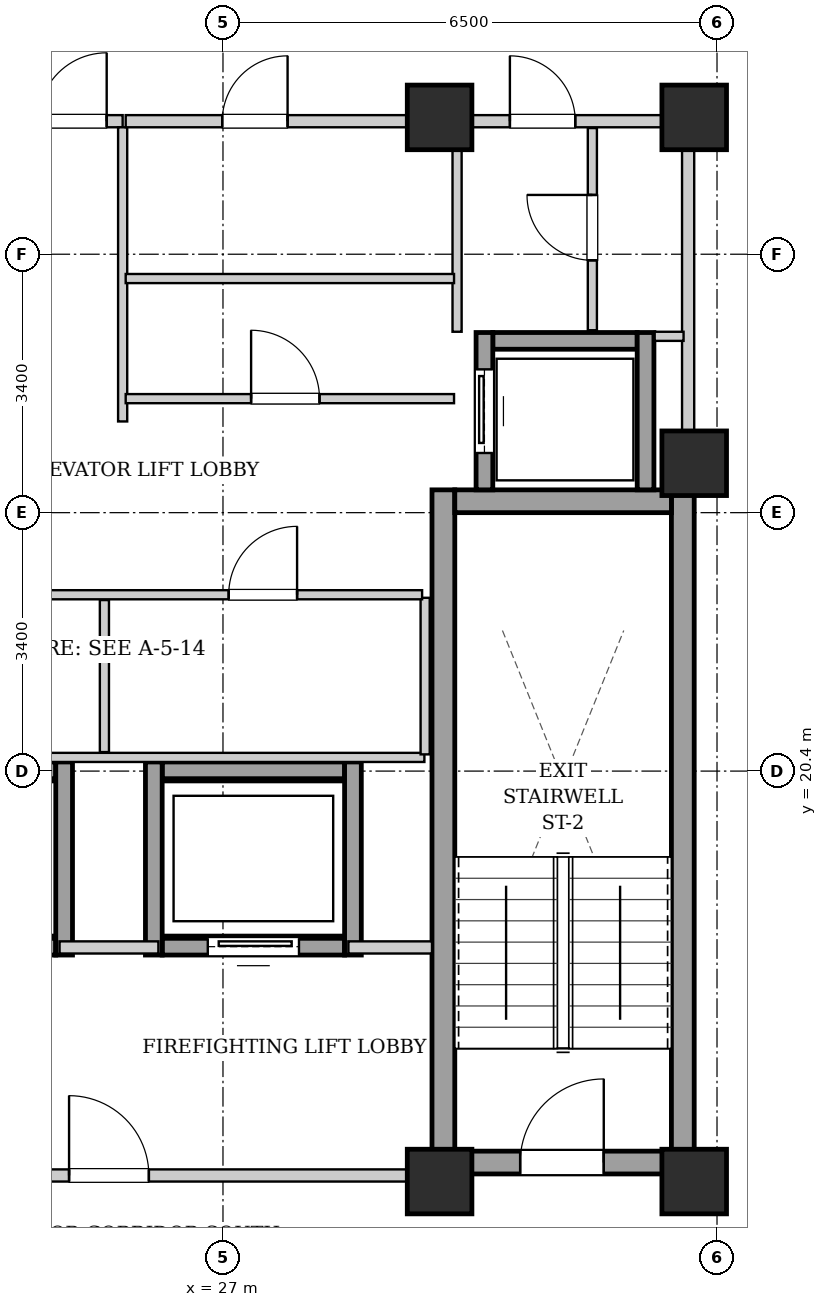
"""IFC4 building model, lengths in metres.
Left out: names, types, materials, properties, quantities, classifications, styles, units other than length and angle.
Written with IfcOpenShell. Run it as: python <this file> out.ifc"""

import sys

from ifc_helpers import new_model, si_unit, direction, frame, frame_2d, origin, origin_2d, place, context, subcontext, project, spatial, rectangle, extrude, element, fill, save


model = new_model("IFC4")
c1 = context("Model", 3, precision=1e-05, world=origin(), true_north=direction((0.0, 1.0)))
c2 = subcontext(c1, "Body", "Model", "MODEL_VIEW")
j1 = project(units=[si_unit("LENGTHUNIT", "METRE"), si_unit("PLANEANGLEUNIT", "RADIAN")], contexts=[c1])
p1 = place(None, origin())
s1 = spatial("IfcSite", under=j1, at=p1, CompositionType="ELEMENT")
p2 = place(p1, origin())
s2 = spatial("IfcBuilding", under=s1, at=p2, CompositionType="ELEMENT")
p3 = place(p2, frame((0.0, 0.0, 190.9)))
s3 = spatial("IfcBuildingStorey", under=s2, at=p3, CompositionType="ELEMENT", Elevation=190.9)
for number, where, z_axis, x_axis in (
    (1, (29.85, 15.0, 0.0), (0.0, 0.0, 1.0), (1.0, 0.0, 0.0)),
    (2, (33.2, 15.0, 0.0), (0.0, 0.0, 1.0), (1.0, 0.0, 0.0)),
    (3, (29.85, 29.0, 0.0), (0.0, 0.0, 1.0), (1.0, 0.0, 0.0)),
    (4, (33.2, 29.0, 0.0), (0.0, 0.0, 1.0), (1.0, 0.0, 0.0)),
    (5, (33.2, 24.45, 0.0), (0.0, 0.0, 1.0), (1.0, 0.0, 0.0)),
):
    element("IfcColumn", number, at=place(p3, frame(where, z_axis=z_axis, x_axis=x_axis)), inside=s3, PredefinedType="COLUMN", context=c2, shape_type="SweptSolid", body=[
        extrude(rectangle(XDim=0.85, YDim=0.85, at=origin_2d()), origin(), (0.0, 0.0, 1.0), 3.3),
    ])
for number, where, z_axis, x_axis in (
    (6, (29.9, 15.1, 0.0), (0.0, 0.0, 1.0), (0.0, 1.0, 0.0)),
    (7, (33.05, 15.1, 0.0), (0.0, 0.0, 1.0), (0.0, 1.0, 0.0)),
):
    element("IfcWall", number, at=place(p3, frame(where, z_axis=z_axis, x_axis=x_axis)), inside=s3, PredefinedType="SHEAR", context=c2, shape_type="SweptSolid", body=[
        extrude(rectangle(XDim=9.0, YDim=0.3, at=frame_2d((4.5, 0.0))), origin(), (0.0, 0.0, 1.0), 3.04),
    ])
p4 = place(p3, frame((30.05, 23.95, 0.0), z_axis=(0.0, 0.0, 1.0), x_axis=(1.0, 0.0, 0.0)))
e8 = element("IfcWall", 8, at=p4, inside=s3, PredefinedType="SHEAR", context=c2, shape_type="SweptSolid", body=[
    extrude(rectangle(XDim=2.85, YDim=0.3, at=frame_2d((1.425, 0.0))), origin(), (0.0, 0.0, 1.0), 3.04),
])
p5 = place(p3, frame((30.05, 15.25, 0.0), z_axis=(0.0, 0.0, 1.0), x_axis=(1.0, 0.0, 0.0)))
e9 = element("IfcWall", 9, at=p5, inside=s3, PredefinedType="SHEAR", context=c2, shape_type="SweptSolid", body=[
    extrude(rectangle(XDim=2.85, YDim=0.3, at=frame_2d((1.425, 0.0))), origin(), (0.0, 0.0, 1.0), 3.04),
])
p6 = place(p5, frame((0.86, 0.0, 0.0)))
e10 = element("IfcOpeningElement", 10, at=p6, cuts=e9, PredefinedType="OPENING", context=c2, shape_type="SweptSolid", body=[
    extrude(rectangle(XDim=1.1, YDim=2.05, at=frame_2d((0.55, 1.025))), frame((0.0, 0.16, 0.0), z_axis=(0.0, -1.0, 0.0), x_axis=(1.0, 0.0, 0.0)), (0.0, 0.0, 1.0), 0.32),
])
p7 = place(p3, frame((30.55, 26.06, 0.0), z_axis=(0.0, 0.0, 1.0), x_axis=(1.0, 0.0, 0.0)))
e11 = element("IfcWall", 11, at=p7, inside=s3, PredefinedType="SHEAR", context=c2, shape_type="SweptSolid", body=[
    extrude(rectangle(XDim=1.9, YDim=0.22, at=frame_2d((0.95, 0.0))), origin(), (0.0, 0.0, 1.0), 3.04),
])
p8 = place(p3, frame((30.44, 24.1, 0.0), z_axis=(0.0, 0.0, 1.0), x_axis=(0.0, 1.0, 0.0)))
e12 = element("IfcWall", 12, at=p8, inside=s3, PredefinedType="SHEAR", context=c2, shape_type="SweptSolid", body=[
    extrude(rectangle(XDim=2.07, YDim=0.22, at=frame_2d((1.035, 0.0))), origin(), (0.0, 0.0, 1.0), 3.04),
])
p9 = place(p8, frame((0.485, 0.0, 0.0)))
e13 = element("IfcOpeningElement", 13, at=p9, cuts=e12, PredefinedType="OPENING", context=c2, shape_type="SweptSolid", body=[
    extrude(rectangle(XDim=1.1, YDim=2.15, at=frame_2d((0.55, 1.075))), frame((0.0, 0.12, 0.0), z_axis=(0.0, -1.0, 0.0), x_axis=(1.0, 0.0, 0.0)), (0.0, 0.0, 1.0), 0.24),
])
p10 = place(p3, frame((32.56, 24.1, 0.0), z_axis=(0.0, 0.0, 1.0), x_axis=(0.0, 1.0, 0.0)))
e14 = element("IfcWall", 14, at=p10, inside=s3, PredefinedType="SHEAR", context=c2, shape_type="SweptSolid", body=[
    extrude(rectangle(XDim=2.07, YDim=0.22, at=frame_2d((1.035, 0.0))), origin(), (0.0, 0.0, 1.0), 3.04),
])
p11 = place(p3, frame((22.4, 18.09, 0.0), z_axis=(0.0, 0.0, 1.0), x_axis=(1.0, 0.0, 0.0)))
e15 = element("IfcWall", 15, at=p11, inside=s3, PredefinedType="SHEAR", context=c2, shape_type="SweptSolid", body=[
    extrude(rectangle(XDim=2.4, YDim=0.22, at=frame_2d((1.2, 0.0))), origin(), (0.0, 0.0, 1.0), 3.04),
])
p12 = place(p11, frame((0.6, 0.0, 0.0)))
e16 = element("IfcOpeningElement", 16, at=p12, cuts=e15, PredefinedType="OPENING", context=c2, shape_type="SweptSolid", body=[
    extrude(rectangle(XDim=1.2, YDim=2.15, at=frame_2d((0.6, 1.075))), frame((0.0, 0.12, 0.0), z_axis=(0.0, -1.0, 0.0), x_axis=(1.0, 0.0, 0.0)), (0.0, 0.0, 1.0), 0.24),
])
p13 = place(p3, frame((22.4, 20.41, 0.0), z_axis=(0.0, 0.0, 1.0), x_axis=(1.0, 0.0, 0.0)))
e17 = element("IfcWall", 17, at=p13, inside=s3, PredefinedType="SHEAR", context=c2, shape_type="SweptSolid", body=[
    extrude(rectangle(XDim=2.4, YDim=0.22, at=frame_2d((1.2, 0.0))), origin(), (0.0, 0.0, 1.0), 3.04),
])
p14 = place(p3, frame((24.91, 17.98, 0.0), z_axis=(0.0, 0.0, 1.0), x_axis=(0.0, 1.0, 0.0)))
e18 = element("IfcWall", 18, at=p14, inside=s3, PredefinedType="SHEAR", context=c2, shape_type="SweptSolid", body=[
    extrude(rectangle(XDim=2.54, YDim=0.22, at=frame_2d((1.27, 0.0))), origin(), (0.0, 0.0, 1.0), 3.04),
])
p15 = place(p3, frame((26.2, 18.09, 0.0), z_axis=(0.0, 0.0, 1.0), x_axis=(1.0, 0.0, 0.0)))
e19 = element("IfcWall", 19, at=p15, inside=s3, PredefinedType="SHEAR", context=c2, shape_type="SweptSolid", body=[
    extrude(rectangle(XDim=2.4, YDim=0.22, at=frame_2d((1.2, 0.0))), origin(), (0.0, 0.0, 1.0), 3.04),
])
p16 = place(p15, frame((0.6, 0.0, 0.0)))
e20 = element("IfcOpeningElement", 20, at=p16, cuts=e19, PredefinedType="OPENING", context=c2, shape_type="SweptSolid", body=[
    extrude(rectangle(XDim=1.2, YDim=2.15, at=frame_2d((0.6, 1.075))), frame((0.0, 0.12, 0.0), z_axis=(0.0, -1.0, 0.0), x_axis=(1.0, 0.0, 0.0)), (0.0, 0.0, 1.0), 0.24),
])
p17 = place(p3, frame((26.2, 20.41, 0.0), z_axis=(0.0, 0.0, 1.0), x_axis=(1.0, 0.0, 0.0)))
e21 = element("IfcWall", 21, at=p17, inside=s3, PredefinedType="SHEAR", context=c2, shape_type="SweptSolid", body=[
    extrude(rectangle(XDim=2.4, YDim=0.22, at=frame_2d((1.2, 0.0))), origin(), (0.0, 0.0, 1.0), 3.04),
])
for number, where, z_axis, x_axis in (
    (22, (26.09, 17.98, 0.0), (0.0, 0.0, 1.0), (0.0, 1.0, 0.0)),
    (23, (28.71, 17.98, 0.0), (0.0, 0.0, 1.0), (0.0, 1.0, 0.0)),
):
    element("IfcWall", number, at=place(p3, frame(where, z_axis=z_axis, x_axis=x_axis)), inside=s3, PredefinedType="SHEAR", context=c2, shape_type="SweptSolid", body=[
        extrude(rectangle(XDim=2.54, YDim=0.22, at=frame_2d((1.27, 0.0))), origin(), (0.0, 0.0, 1.0), 3.04),
    ])
p18 = place(p3, frame((21.25, 15.08, 0.0), z_axis=(0.0, 0.0, 1.0), x_axis=(1.0, 0.0, 0.0)))
e24 = element("IfcWall", 24, at=p18, inside=s3, PredefinedType="PARTITIONING", context=c2, shape_type="SweptSolid", body=[
    extrude(rectangle(XDim=8.5, YDim=0.16, at=frame_2d((4.25, 0.0))), origin(), (0.0, 0.0, 1.0), 2.556),
])
p19 = place(p18, frame((3.725, 0.0, 0.0)))
e25 = element("IfcOpeningElement", 25, at=p19, cuts=e24, PredefinedType="OPENING", context=c2, shape_type="SweptSolid", body=[
    extrude(rectangle(XDim=1.05, YDim=2.05, at=frame_2d((0.525, 1.025))), frame((0.0, 0.09, 0.0), z_axis=(0.0, -1.0, 0.0), x_axis=(1.0, 0.0, 0.0)), (0.0, 0.0, 1.0), 0.18),
])
p20 = place(p3, frame((24.85, 18.08, 0.0), z_axis=(0.0, 0.0, 1.0), x_axis=(1.0, 0.0, 0.0)))
e26 = element("IfcWall", 26, at=p20, inside=s3, PredefinedType="PARTITIONING", context=c2, shape_type="SweptSolid", body=[
    extrude(rectangle(XDim=1.3, YDim=0.16, at=frame_2d((0.65, 0.0))), origin(), (0.0, 0.0, 1.0), 3.04),
])
p21 = place(p3, frame((28.65, 18.08, 0.0), z_axis=(0.0, 0.0, 1.0), x_axis=(1.0, 0.0, 0.0)))
e27 = element("IfcWall", 27, at=p21, inside=s3, PredefinedType="PARTITIONING", context=c2, shape_type="SweptSolid", body=[
    extrude(rectangle(XDim=1.1, YDim=0.16, at=frame_2d((0.55, 0.0))), origin(), (0.0, 0.0, 1.0), 3.04),
])
p22 = place(p3, frame((33.12, 24.12, 0.0), z_axis=(0.0, 0.0, 1.0), x_axis=(0.0, 1.0, 0.0)))
e28 = element("IfcWall", 28, at=p22, inside=s3, PredefinedType="PARTITIONING", context=c2, shape_type="SweptSolid", body=[
    extrude(rectangle(XDim=4.76, YDim=0.16, at=frame_2d((2.38, 0.0))), origin(), (0.0, 0.0, 1.0), 3.04),
])
p23 = place(p3, frame((24.36, 28.95, 0.0), z_axis=(0.0, 0.0, 1.0), x_axis=(1.0, 0.0, 0.0)))
e29 = element("IfcWall", 29, at=p23, inside=s3, PredefinedType="PARTITIONING", context=c2, shape_type="SweptSolid", body=[
    extrude(rectangle(XDim=1.32, YDim=0.16, at=frame_2d((0.66, 0.0))), origin(), (0.0, 0.0, 1.0), 2.556),
])
p24 = place(p23, frame((0.21, 0.0, 0.0)))
e30 = element("IfcOpeningElement", 30, at=p24, cuts=e29, PredefinedType="OPENING", context=c2, shape_type="SweptSolid", body=[
    extrude(rectangle(XDim=0.9, YDim=2.05, at=frame_2d((0.45, 1.025))), frame((0.0, 0.09, 0.0), z_axis=(0.0, -1.0, 0.0), x_axis=(1.0, 0.0, 0.0)), (0.0, 0.0, 1.0), 0.18),
])
p25 = place(p3, frame((25.68, 25.0, 0.0), z_axis=(0.0, 0.0, 1.0), x_axis=(0.0, 1.0, 0.0)))
e31 = element("IfcWall", 31, at=p25, inside=s3, PredefinedType="PARTITIONING", context=c2, shape_type="SweptSolid", body=[
    extrude(rectangle(XDim=3.87, YDim=0.12, at=frame_2d((1.935, 0.0))), origin(), (0.0, 0.0, 1.0), 3.04),
])
p26 = place(p3, frame((30.08, 26.18, 0.0), z_axis=(0.0, 0.0, 1.0), x_axis=(0.0, 1.0, 0.0)))
e32 = element("IfcWall", 32, at=p26, inside=s3, PredefinedType="PARTITIONING", context=c2, shape_type="SweptSolid", body=[
    extrude(rectangle(XDim=2.68, YDim=0.12, at=frame_2d((1.34, 0.0))), origin(), (0.0, 0.0, 1.0), 3.04),
])
p27 = place(p3, frame((32.68, 26.12, 0.0), z_axis=(0.0, 0.0, 1.0), x_axis=(1.0, 0.0, 0.0)))
e33 = element("IfcWall", 33, at=p27, inside=s3, PredefinedType="PARTITIONING", context=c2, shape_type="SweptSolid", body=[
    extrude(rectangle(XDim=0.38, YDim=0.12, at=frame_2d((0.19, 0.0))), origin(), (0.0, 0.0, 1.0), 3.04),
])
p28 = place(p3, frame((31.86, 26.2, 0.0), z_axis=(0.0, 0.0, 1.0), x_axis=(0.0, 1.0, 0.0)))
e34 = element("IfcWall", 34, at=p28, inside=s3, PredefinedType="PARTITIONING", context=c2, shape_type="SweptSolid", body=[
    extrude(rectangle(XDim=2.66, YDim=0.12, at=frame_2d((1.33, 0.0))), origin(), (0.0, 0.0, 1.0), 3.04),
])
p29 = place(p28, frame((0.92, 0.0, 0.0)))
e35 = element("IfcOpeningElement", 35, at=p29, cuts=e34, PredefinedType="OPENING", context=c2, shape_type="SweptSolid", body=[
    extrude(rectangle(XDim=0.86, YDim=2.05, at=frame_2d((0.43, 1.025))), frame((0.0, 0.07, 0.0), z_axis=(0.0, -1.0, 0.0), x_axis=(1.0, 0.0, 0.0)), (0.0, 0.0, 1.0), 0.14),
])
p30 = place(p3, frame((30.08, 28.95, 0.0), z_axis=(0.0, 0.0, 1.0), x_axis=(1.0, 0.0, 0.0)))
e36 = element("IfcWall", 36, at=p30, inside=s3, PredefinedType="PARTITIONING", context=c2, shape_type="SweptSolid", body=[
    extrude(rectangle(XDim=2.96, YDim=0.16, at=frame_2d((1.48, 0.0))), origin(), (0.0, 0.0, 1.0), 3.04),
])
p31 = place(p30, frame((0.695, 0.0, 0.0)))
e37 = element("IfcOpeningElement", 37, at=p31, cuts=e36, PredefinedType="OPENING", context=c2, shape_type="SweptSolid", body=[
    extrude(rectangle(XDim=0.86, YDim=2.05, at=frame_2d((0.43, 1.025))), frame((0.0, 0.09, 0.0), z_axis=(0.0, -1.0, 0.0), x_axis=(1.0, 0.0, 0.0)), (0.0, 0.0, 1.0), 0.18),
])
p32 = place(p3, frame((25.72, 26.88, 0.0), z_axis=(0.0, 0.0, 1.0), x_axis=(1.0, 0.0, 0.0)))
e38 = element("IfcWall", 38, at=p32, inside=s3, PredefinedType="PARTITIONING", context=c2, shape_type="SweptSolid", body=[
    extrude(rectangle(XDim=4.32, YDim=0.12, at=frame_2d((2.16, 0.0))), origin(), (0.0, 0.0, 1.0), 3.04),
])
p33 = place(p3, frame((25.72, 25.3, 0.0), z_axis=(0.0, 0.0, 1.0), x_axis=(1.0, 0.0, 0.0)))
e39 = element("IfcWall", 39, at=p33, inside=s3, PredefinedType="PARTITIONING", context=c2, shape_type="SweptSolid", body=[
    extrude(rectangle(XDim=4.32, YDim=0.12, at=frame_2d((2.16, 0.0))), origin(), (0.0, 0.0, 1.0), 3.04),
])
p34 = place(p33, frame((1.65, 0.0, 0.0)))
e40 = element("IfcOpeningElement", 40, at=p34, cuts=e39, PredefinedType="OPENING", context=c2, shape_type="SweptSolid", body=[
    extrude(rectangle(XDim=0.9, YDim=2.05, at=frame_2d((0.45, 1.025))), frame((0.0, 0.07, 0.0), z_axis=(0.0, -1.0, 0.0), x_axis=(1.0, 0.0, 0.0)), (0.0, 0.0, 1.0), 0.14),
])
p35 = place(p3, frame((25.72, 28.95, 0.0), z_axis=(0.0, 0.0, 1.0), x_axis=(1.0, 0.0, 0.0)))
e41 = element("IfcWall", 41, at=p35, inside=s3, PredefinedType="PARTITIONING", context=c2, shape_type="SweptSolid", body=[
    extrude(rectangle(XDim=4.32, YDim=0.16, at=frame_2d((2.16, 0.0))), origin(), (0.0, 0.0, 1.0), 2.556),
])
p36 = place(p35, frame((1.27, 0.0, 0.0)))
e42 = element("IfcOpeningElement", 42, at=p36, cuts=e41, PredefinedType="OPENING", context=c2, shape_type="SweptSolid", body=[
    extrude(rectangle(XDim=0.86, YDim=2.05, at=frame_2d((0.43, 1.025))), frame((0.0, 0.09, 0.0), z_axis=(0.0, -1.0, 0.0), x_axis=(1.0, 0.0, 0.0)), (0.0, 0.0, 1.0), 0.18),
])
p37 = place(p3, frame((22.3, 20.58, 0.0), z_axis=(0.0, 0.0, 1.0), x_axis=(1.0, 0.0, 0.0)))
e43 = element("IfcWall", 43, at=p37, inside=s3, PredefinedType="PARTITIONING", context=c2, shape_type="SweptSolid", body=[
    extrude(rectangle(XDim=7.35, YDim=0.12, at=frame_2d((3.675, 0.0))), origin(), (0.0, 0.0, 1.0), 3.04),
])
p38 = place(p3, frame((29.66, 20.62, 0.0), z_axis=(0.0, 0.0, 1.0), x_axis=(0.0, 1.0, 0.0)))
e44 = element("IfcWall", 44, at=p38, inside=s3, PredefinedType="PARTITIONING", context=c2, shape_type="SweptSolid", body=[
    extrude(rectangle(XDim=2.06, YDim=0.12, at=frame_2d((1.03, 0.0))), origin(), (0.0, 0.0, 1.0), 3.04),
])
p39 = place(p3, frame((25.44, 20.65, 0.0), z_axis=(0.0, 0.0, 1.0), x_axis=(0.0, 1.0, 0.0)))
e45 = element("IfcWall", 45, at=p39, inside=s3, PredefinedType="PARTITIONING", context=c2, shape_type="SweptSolid", body=[
    extrude(rectangle(XDim=2.0, YDim=0.12, at=frame_2d((1.0, 0.0))), origin(), (0.0, 0.0, 1.0), 3.04),
])
p40 = place(p3, frame((22.35, 22.72, 0.0), z_axis=(0.0, 0.0, 1.0), x_axis=(1.0, 0.0, 0.0)))
e46 = element("IfcWall", 46, at=p40, inside=s3, PredefinedType="PARTITIONING", context=c2, shape_type="SweptSolid", body=[
    extrude(rectangle(XDim=7.27, YDim=0.12, at=frame_2d((3.635, 0.0))), origin(), (0.0, 0.0, 1.0), 3.04),
])
p41 = place(p40, frame((1.175, 0.0, 0.0)))
e47 = element("IfcOpeningElement", 47, at=p41, cuts=e46, PredefinedType="OPENING", context=c2, shape_type="SweptSolid", body=[
    extrude(rectangle(XDim=0.9, YDim=2.05, at=frame_2d((0.45, 1.025))), frame((0.0, 0.07, 0.0), z_axis=(0.0, -1.0, 0.0), x_axis=(1.0, 0.0, 0.0)), (0.0, 0.0, 1.0), 0.14),
])
p42 = place(p40, frame((4.725, 0.0, 0.0)))
e48 = element("IfcOpeningElement", 48, at=p42, cuts=e46, PredefinedType="OPENING", context=c2, shape_type="SweptSolid", body=[
    extrude(rectangle(XDim=0.9, YDim=2.05, at=frame_2d((0.45, 1.025))), frame((0.0, 0.07, 0.0), z_axis=(0.0, -1.0, 0.0), x_axis=(1.0, 0.0, 0.0)), (0.0, 0.0, 1.0), 0.14),
])
p43 = place(p6, origin())
e49 = element("IfcDoor", 49, at=p43, inside=s3, OperationType="SINGLE_SWING_RIGHT", PredefinedType="DOOR", context=c2, shape_type="SweptSolid", body=[
    extrude(rectangle(XDim=1.1, YDim=2.05, at=frame_2d((0.55, 1.025))), frame((0.0, 0.025, 0.0), z_axis=(0.0, -1.0, 0.0), x_axis=(1.0, 0.0, 0.0)), (0.0, 0.0, 1.0), 0.05),
])
fill(e10, e49)
p44 = place(p9, origin())
e50 = element("IfcDoor", 50, at=p44, inside=s3, OperationType="SLIDING_TO_LEFT", PredefinedType="DOOR", context=c2, shape_type="SweptSolid", body=[
    extrude(rectangle(XDim=1.1, YDim=2.15, at=frame_2d((0.55, 1.075))), frame((0.0, 0.025, 0.0), z_axis=(0.0, -1.0, 0.0), x_axis=(1.0, 0.0, 0.0)), (0.0, 0.0, 1.0), 0.05),
])
fill(e13, e50)
p45 = place(p16, origin())
e51 = element("IfcDoor", 51, at=p45, inside=s3, OperationType="SLIDING_TO_LEFT", PredefinedType="DOOR", context=c2, shape_type="SweptSolid", body=[
    extrude(rectangle(XDim=1.2, YDim=2.15, at=frame_2d((0.6, 1.075))), frame((0.0, 0.025, 0.0), z_axis=(0.0, -1.0, 0.0), x_axis=(1.0, 0.0, 0.0)), (0.0, 0.0, 1.0), 0.05),
])
fill(e20, e51)
p46 = place(p19, origin())
e52 = element("IfcDoor", 52, at=p46, inside=s3, OperationType="SINGLE_SWING_LEFT", PredefinedType="DOOR", context=c2, shape_type="SweptSolid", body=[
    extrude(rectangle(XDim=1.05, YDim=2.05, at=frame_2d((0.525, 1.025))), frame((0.0, 0.025, 0.0), z_axis=(0.0, -1.0, 0.0), x_axis=(1.0, 0.0, 0.0)), (0.0, 0.0, 1.0), 0.05),
])
fill(e25, e52)
p47 = place(p24, origin())
e53 = element("IfcDoor", 53, at=p47, inside=s3, OperationType="SINGLE_SWING_RIGHT", PredefinedType="DOOR", context=c2, shape_type="SweptSolid", body=[
    extrude(rectangle(XDim=0.9, YDim=2.05, at=frame_2d((0.45, 1.025))), frame((0.0, 0.025, 0.0), z_axis=(0.0, -1.0, 0.0), x_axis=(1.0, 0.0, 0.0)), (0.0, 0.0, 1.0), 0.05),
])
fill(e30, e53)
p48 = place(p29, origin())
e54 = element("IfcDoor", 54, at=p48, inside=s3, OperationType="SINGLE_SWING_RIGHT", PredefinedType="DOOR", context=c2, shape_type="SweptSolid", body=[
    extrude(rectangle(XDim=0.86, YDim=2.05, at=frame_2d((0.43, 1.025))), frame((0.0, 0.025, 0.0), z_axis=(0.0, -1.0, 0.0), x_axis=(1.0, 0.0, 0.0)), (0.0, 0.0, 1.0), 0.05),
])
fill(e35, e54)
p49 = place(p31, origin())
e55 = element("IfcDoor", 55, at=p49, inside=s3, OperationType="SINGLE_SWING_LEFT", PredefinedType="DOOR", context=c2, shape_type="SweptSolid", body=[
    extrude(rectangle(XDim=0.86, YDim=2.05, at=frame_2d((0.43, 1.025))), frame((0.0, 0.025, 0.0), z_axis=(0.0, -1.0, 0.0), x_axis=(1.0, 0.0, 0.0)), (0.0, 0.0, 1.0), 0.05),
])
fill(e37, e55)
p50 = place(p34, origin())
e56 = element("IfcDoor", 56, at=p50, inside=s3, OperationType="SINGLE_SWING_LEFT", PredefinedType="DOOR", context=c2, shape_type="SweptSolid", body=[
    extrude(rectangle(XDim=0.9, YDim=2.05, at=frame_2d((0.45, 1.025))), frame((0.0, 0.025, 0.0), z_axis=(0.0, -1.0, 0.0), x_axis=(1.0, 0.0, 0.0)), (0.0, 0.0, 1.0), 0.05),
])
fill(e40, e56)
p51 = place(p36, origin())
e57 = element("IfcDoor", 57, at=p51, inside=s3, OperationType="SINGLE_SWING_RIGHT", PredefinedType="DOOR", context=c2, shape_type="SweptSolid", body=[
    extrude(rectangle(XDim=0.86, YDim=2.05, at=frame_2d((0.43, 1.025))), frame((0.0, 0.025, 0.0), z_axis=(0.0, -1.0, 0.0), x_axis=(1.0, 0.0, 0.0)), (0.0, 0.0, 1.0), 0.05),
])
fill(e42, e57)
p52 = place(p42, origin())
e58 = element("IfcDoor", 58, at=p52, inside=s3, OperationType="SINGLE_SWING_RIGHT", PredefinedType="DOOR", context=c2, shape_type="SweptSolid", body=[
    extrude(rectangle(XDim=0.9, YDim=2.05, at=frame_2d((0.45, 1.025))), frame((0.0, 0.025, 0.0), z_axis=(0.0, -1.0, 0.0), x_axis=(1.0, 0.0, 0.0)), (0.0, 0.0, 1.0), 0.05),
])
fill(e48, e58)
save(model, sys.argv[1])
